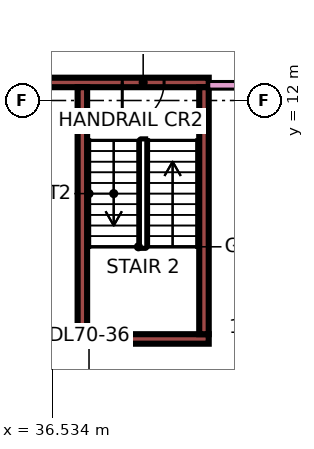
"""IFC4 building model, lengths in metres.
Left out: names, types, materials, properties, quantities, classifications, styles, units other than length and angle.
Written with IfcOpenShell. Run it as: python <this file> out.ifc"""

import sys

from ifc_helpers import new_model, si_unit, direction, frame, frame_2d, origin, place, context, subcontext, project, spatial, rectangle, extrude, element, fill, save


model = new_model("IFC4")
c1 = context("Model", 3, precision=1e-05, world=origin(), true_north=direction((0.0, 1.0)))
c2 = subcontext(c1, "Body", "Model", "MODEL_VIEW")
j1 = project(units=[si_unit("LENGTHUNIT", "METRE"), si_unit("PLANEANGLEUNIT", "RADIAN")], contexts=[c1])
p1 = place(None, origin())
s1 = spatial("IfcSite", under=j1, at=p1, CompositionType="ELEMENT")
p2 = place(p1, origin())
s2 = spatial("IfcBuilding", under=s1, at=p2, CompositionType="ELEMENT")
p3 = place(p2, frame((0.0, 0.0, 299.65)))
s3 = spatial("IfcBuildingStorey", under=s2, at=p3, CompositionType="ELEMENT", Elevation=299.65)
p4 = place(p3, frame((37.2, 5.725, 0.0), z_axis=(0.0, 0.0, 1.0), x_axis=(1.0, 0.0, 0.0)))
e1 = element("IfcWall", 1, at=p4, inside=s3, PredefinedType="SHEAR", context=c2, shape_type="SweptSolid", body=[
    extrude(rectangle(XDim=3.45, YDim=0.25, at=frame_2d((1.725, 0.0))), origin(), (0.0, 0.0, 1.0), 3.75),
])
p5 = place(p3, frame((36.4, 12.475, 0.0), z_axis=(0.0, 0.0, 1.0), x_axis=(1.0, 0.0, 0.0)))
e2 = element("IfcWall", 2, at=p5, inside=s3, PredefinedType="SHEAR", context=c2, shape_type="SweptSolid", body=[
    extrude(rectangle(XDim=4.25, YDim=0.25, at=frame_2d((2.125, 0.0))), origin(), (0.0, 0.0, 1.0), 3.75),
])
p6 = place(p5, frame((1.975, 0.0, 0.0)))
e3 = element("IfcOpeningElement", 3, at=p6, cuts=e2, PredefinedType="OPENING", context=c2, shape_type="SweptSolid", body=[
    extrude(rectangle(XDim=1.1, YDim=2.2, at=frame_2d((0.55, 1.1))), frame((0.0, 0.135, 0.0), z_axis=(0.0, -1.0, 0.0), x_axis=(1.0, 0.0, 0.0)), (0.0, 0.0, 1.0), 0.27),
])
for number, where, z_axis, x_axis in (
    (4, (37.325, 5.85, 0.0), (0.0, 0.0, 1.0), (0.0, 1.0, 0.0)),
    (5, (40.525, 5.85, 0.0), (0.0, 0.0, 1.0), (0.0, 1.0, 0.0)),
):
    element("IfcWall", number, at=place(p3, frame(where, z_axis=z_axis, x_axis=x_axis)), inside=s3, PredefinedType="SHEAR", context=c2, shape_type="SweptSolid", body=[
        extrude(rectangle(XDim=6.5, YDim=0.25, at=frame_2d((3.25, 0.0))), origin(), (0.0, 0.0, 1.0), 3.75),
    ])
p7 = place(p3, frame((40.65, 12.4, 0.0), z_axis=(0.0, 0.0, 1.0), x_axis=(1.0, 0.0, 0.0)))
e6 = element("IfcWall", 6, at=p7, inside=s3, PredefinedType="PARTITIONING", context=c2, shape_type="SweptSolid", body=[
    extrude(rectangle(XDim=22.276, YDim=0.2, at=frame_2d((11.138, 0.0))), origin(), (0.0, 0.0, 1.0), 3.35),
])
p8 = place(p7, frame((20.25, 0.0, 0.0)))
e7 = element("IfcOpeningElement", 7, at=p8, cuts=e6, PredefinedType="OPENING", context=c2, shape_type="SweptSolid", body=[
    extrude(rectangle(XDim=1.0, YDim=2.1, at=frame_2d((0.5, 1.05))), frame((0.0, 0.11, 0.0), z_axis=(0.0, -1.0, 0.0), x_axis=(1.0, 0.0, 0.0)), (0.0, 0.0, 1.0), 0.22),
])
p9 = place(p7, frame((1.05, 0.0, 0.0)))
e8 = element("IfcOpeningElement", 8, at=p9, cuts=e6, PredefinedType="OPENING", context=c2, shape_type="SweptSolid", body=[
    extrude(rectangle(XDim=1.0, YDim=2.1, at=frame_2d((0.5, 1.05))), frame((0.0, 0.11, 0.0), z_axis=(0.0, -1.0, 0.0), x_axis=(1.0, 0.0, 0.0)), (0.0, 0.0, 1.0), 0.22),
])
p10 = place(p6, frame((1.1, 0.0, 0.0), z_axis=(0.0, 0.0, 1.0), x_axis=(-1.0, 0.0, 0.0)))
e9 = element("IfcDoor", 9, at=p10, inside=s3, OperationType="SINGLE_SWING_LEFT", PredefinedType="DOOR", context=c2, shape_type="SweptSolid", body=[
    extrude(rectangle(XDim=1.1, YDim=2.2, at=frame_2d((0.55, 1.1))), frame((0.0, 0.025, 0.0), z_axis=(0.0, -1.0, 0.0), x_axis=(1.0, 0.0, 0.0)), (0.0, 0.0, 1.0), 0.05),
])
fill(e3, e9)
save(model, sys.argv[1])
